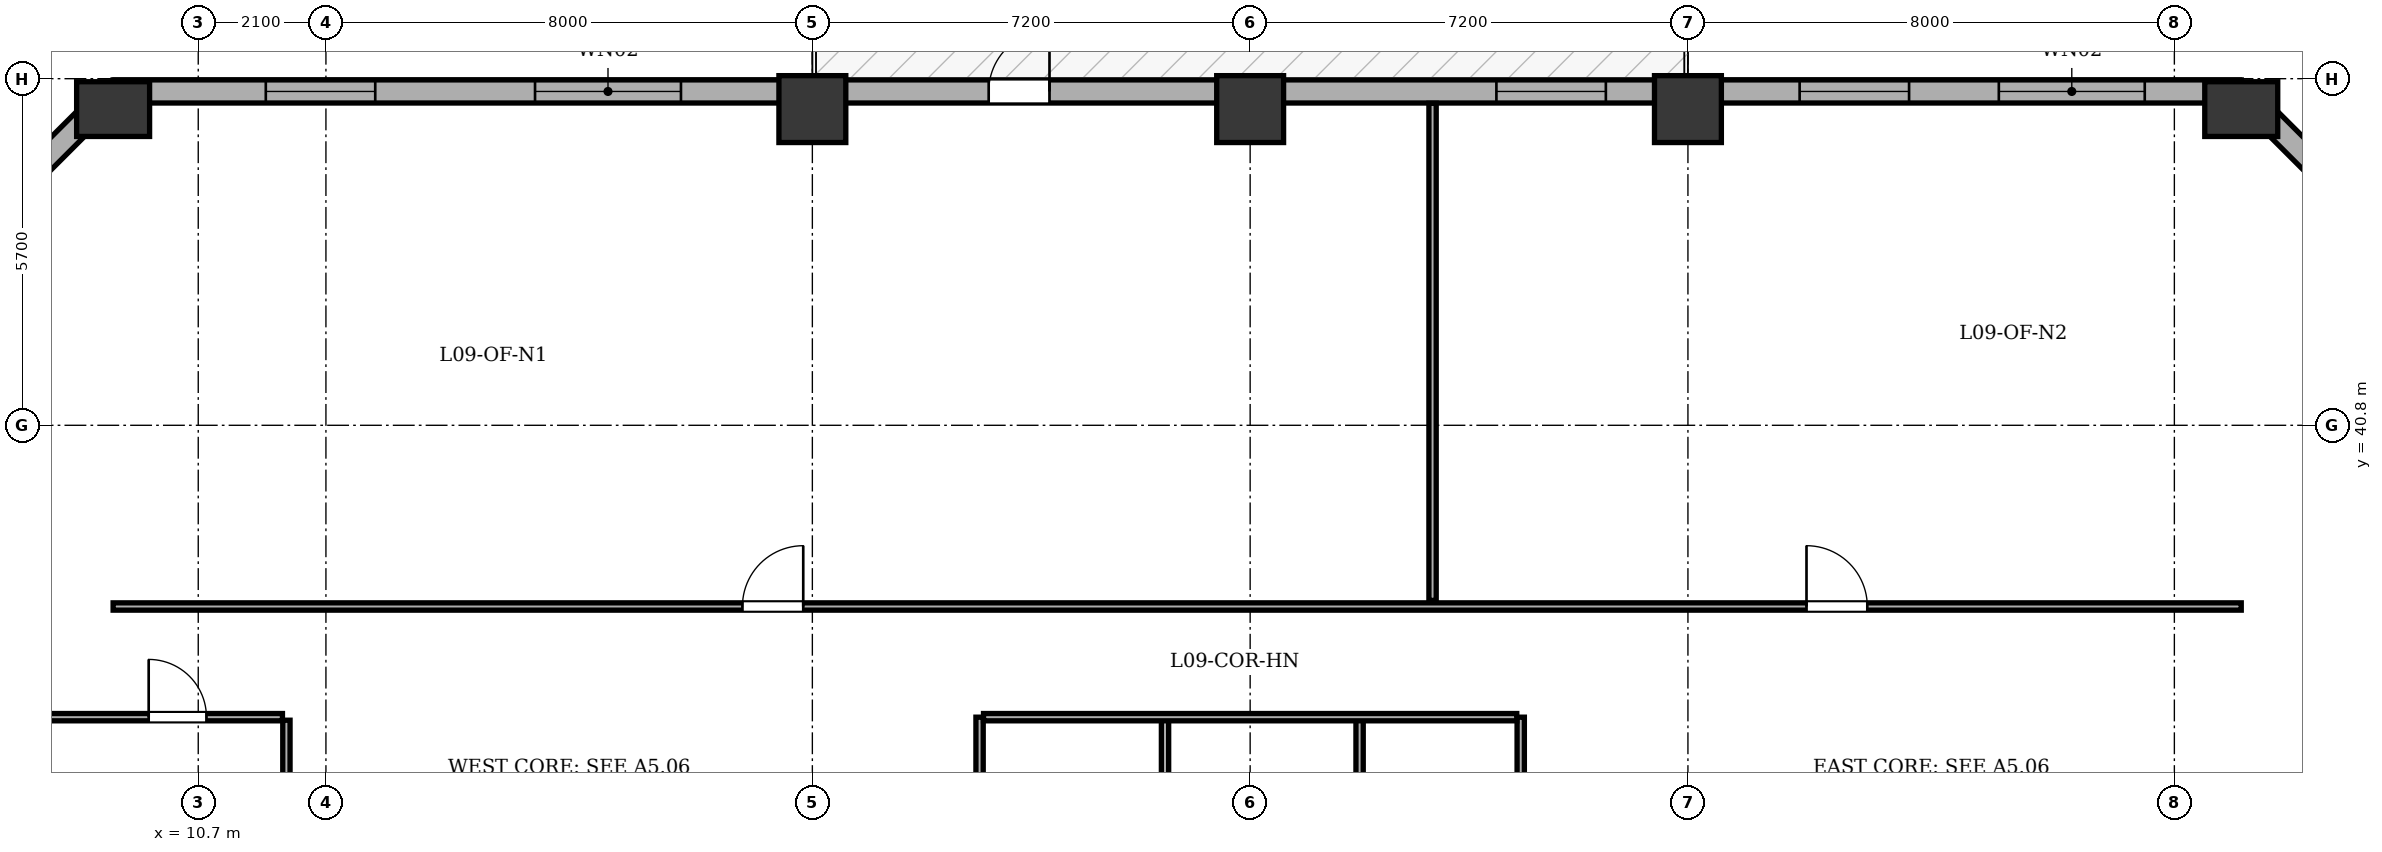
"""IFC4 building model, lengths in metres.
Left out: names, types, materials, properties, quantities, classifications, styles, units other than length and angle.
Written with IfcOpenShell. Run it as: python <this file> out.ifc"""

import sys

from ifc_helpers import new_model, si_unit, direction, frame, frame_2d, origin, origin_2d, place, context, subcontext, project, spatial, rectangle, extrude, element, fill, save


model = new_model("IFC4")
c1 = context("Model", 3, precision=1e-05, world=origin(), true_north=direction((0.0, 1.0)))
c2 = subcontext(c1, "Body", "Model", "MODEL_VIEW")
j1 = project(units=[si_unit("LENGTHUNIT", "METRE"), si_unit("PLANEANGLEUNIT", "RADIAN")], contexts=[c1])
p1 = place(None, origin())
s1 = spatial("IfcSite", under=j1, at=p1, CompositionType="ELEMENT")
p2 = place(p1, origin())
s2 = spatial("IfcBuilding", under=s1, at=p2, CompositionType="ELEMENT")
p3 = place(p2, frame((0.0, 0.0, 39.9)))
s3 = spatial("IfcBuildingStorey", under=s2, at=p3, CompositionType="ELEMENT", Elevation=39.9)
p4 = place(p3, frame((9.3, 46.0, 0.0), z_axis=(0.0, 0.0, 1.0), x_axis=(1.0, 0.0, 0.0)))
e1 = element("IfcColumn", 1, at=p4, inside=s3, PredefinedType="COLUMN", context=c2, shape_type="SweptSolid", body=[
    extrude(rectangle(XDim=0.9, YDim=1.2, at=origin_2d()), origin(), (0.0, 0.0, 1.0), 3.9),
])
for number, where, z_axis, x_axis in (
    (2, (20.8, 46.0, 0.0), (0.0, 0.0, 1.0), (1.0, 0.0, 0.0)),
    (3, (28.0, 46.0, 0.0), (0.0, 0.0, 1.0), (1.0, 0.0, 0.0)),
    (4, (35.2, 46.0, 0.0), (0.0, 0.0, 1.0), (1.0, 0.0, 0.0)),
):
    element("IfcColumn", number, at=place(p3, frame(where, z_axis=z_axis, x_axis=x_axis)), inside=s3, PredefinedType="COLUMN", context=c2, shape_type="SweptSolid", body=[
        extrude(rectangle(XDim=1.1, YDim=1.1, at=origin_2d()), origin(), (0.0, 0.0, 1.0), 3.9),
    ])
p5 = place(p3, frame((44.3, 46.0, 0.0), z_axis=(0.0, 0.0, 1.0), x_axis=(1.0, 0.0, 0.0)))
e5 = element("IfcColumn", 5, at=p5, inside=s3, PredefinedType="COLUMN", context=c2, shape_type="SweptSolid", body=[
    extrude(rectangle(XDim=0.9, YDim=1.2, at=origin_2d()), origin(), (0.0, 0.0, 1.0), 3.9),
])
p6 = place(p3, frame((4.51, 41.5, 0.0), z_axis=(0.0, 0.0, 1.0), x_axis=(0.707106781187, 0.707106781187, 0.0)))
e6 = element("IfcWall", 6, at=p6, inside=s3, PredefinedType="STANDARD", context=c2, shape_type="SweptSolid", body=[
    extrude(rectangle(XDim=6.774, YDim=0.38, at=frame_2d((3.387, 0.0))), origin(), (0.0, 0.0, 1.0), 3.135),
])
p7 = place(p6, frame((2.687, 0.0, 0.8)))
e7 = element("IfcOpeningElement", 7, at=p7, cuts=e6, PredefinedType="OPENING", context=c2, shape_type="SweptSolid", body=[
    extrude(rectangle(XDim=1.4, YDim=1.65, at=frame_2d((0.7, 0.825))), frame((0.0, 0.2, 0.0), z_axis=(0.0, -1.0, 0.0), x_axis=(1.0, 0.0, 0.0)), (0.0, 0.0, 1.0), 0.4),
])
p8 = place(p3, frame((9.3, 46.29, 0.0), z_axis=(0.0, 0.0, 1.0), x_axis=(1.0, 0.0, 0.0)))
e8 = element("IfcWall", 8, at=p8, inside=s3, PredefinedType="STANDARD", context=c2, shape_type="SweptSolid", body=[
    extrude(rectangle(XDim=35.0, YDim=0.38, at=frame_2d((17.5, 0.0))), origin(), (0.0, 0.0, 1.0), 3.135),
])
p9 = place(p8, frame((14.4, 0.0, 0.0)))
e9 = element("IfcOpeningElement", 9, at=p9, cuts=e8, PredefinedType="OPENING", context=c2, shape_type="SweptSolid", body=[
    extrude(rectangle(XDim=1.0, YDim=2.02, at=frame_2d((0.5, 1.01))), frame((0.0, 0.2, 0.0), z_axis=(0.0, -1.0, 0.0), x_axis=(1.0, 0.0, 0.0)), (0.0, 0.0, 1.0), 0.4),
])
p10 = place(p8, frame((2.511, 0.0, 0.8)))
e10 = element("IfcOpeningElement", 10, at=p10, cuts=e8, PredefinedType="OPENING", context=c2, shape_type="SweptSolid", body=[
    extrude(rectangle(XDim=1.8, YDim=1.9, at=frame_2d((0.9, 0.95))), frame((0.0, 0.2, 0.0), z_axis=(0.0, -1.0, 0.0), x_axis=(1.0, 0.0, 0.0)), (0.0, 0.0, 1.0), 0.4),
])
p11 = place(p8, frame((6.939, 0.0, 0.8)))
e11 = element("IfcOpeningElement", 11, at=p11, cuts=e8, PredefinedType="OPENING", context=c2, shape_type="SweptSolid", body=[
    extrude(rectangle(XDim=2.4, YDim=1.9, at=frame_2d((1.2, 0.95))), frame((0.0, 0.2, 0.0), z_axis=(0.0, -1.0, 0.0), x_axis=(1.0, 0.0, 0.0)), (0.0, 0.0, 1.0), 0.4),
])
p12 = place(p8, frame((22.75, 0.0, 0.8)))
e12 = element("IfcOpeningElement", 12, at=p12, cuts=e8, PredefinedType="OPENING", context=c2, shape_type="SweptSolid", body=[
    extrude(rectangle(XDim=1.8, YDim=1.9, at=frame_2d((0.9, 0.95))), frame((0.0, 0.2, 0.0), z_axis=(0.0, -1.0, 0.0), x_axis=(1.0, 0.0, 0.0)), (0.0, 0.0, 1.0), 0.4),
])
p13 = place(p8, frame((27.737, 0.0, 0.8)))
e13 = element("IfcOpeningElement", 13, at=p13, cuts=e8, PredefinedType="OPENING", context=c2, shape_type="SweptSolid", body=[
    extrude(rectangle(XDim=1.8, YDim=1.9, at=frame_2d((0.9, 0.95))), frame((0.0, 0.2, 0.0), z_axis=(0.0, -1.0, 0.0), x_axis=(1.0, 0.0, 0.0)), (0.0, 0.0, 1.0), 0.4),
])
p14 = place(p8, frame((31.013, 0.0, 0.8)))
e14 = element("IfcOpeningElement", 14, at=p14, cuts=e8, PredefinedType="OPENING", context=c2, shape_type="SweptSolid", body=[
    extrude(rectangle(XDim=2.4, YDim=1.9, at=frame_2d((1.2, 0.95))), frame((0.0, 0.2, 0.0), z_axis=(0.0, -1.0, 0.0), x_axis=(1.0, 0.0, 0.0)), (0.0, 0.0, 1.0), 0.4),
])
p15 = place(p3, frame((44.3, 46.29, 0.0), z_axis=(0.0, 0.0, 1.0), x_axis=(0.707106781187, -0.707106781187, 0.0)))
e15 = element("IfcWall", 15, at=p15, inside=s3, PredefinedType="STANDARD", context=c2, shape_type="SweptSolid", body=[
    extrude(rectangle(XDim=6.774, YDim=0.38, at=frame_2d((3.387, 0.0))), origin(), (0.0, 0.0, 1.0), 3.135),
])
p16 = place(p15, frame((2.687, 0.0, 0.8)))
e16 = element("IfcOpeningElement", 16, at=p16, cuts=e15, PredefinedType="OPENING", context=c2, shape_type="SweptSolid", body=[
    extrude(rectangle(XDim=1.4, YDim=1.65, at=frame_2d((0.7, 0.825))), frame((0.0, 0.2, 0.0), z_axis=(0.0, -1.0, 0.0), x_axis=(1.0, 0.0, 0.0)), (0.0, 0.0, 1.0), 0.4),
])
for number, where, z_axis, x_axis in (
    (17, (23.55, 24.715, 0.0), (0.0, 0.0, 1.0), (0.0, 1.0, 0.0)),
    (18, (32.45, 24.715, 0.0), (0.0, 0.0, 1.0), (0.0, 1.0, 0.0)),
    (19, (26.6, 24.715, 0.0), (0.0, 0.0, 1.0), (0.0, 1.0, 0.0)),
):
    element("IfcWall", number, at=place(p3, frame(where, z_axis=z_axis, x_axis=x_axis)), inside=s3, PredefinedType="PARTITIONING", context=c2, shape_type="SweptSolid", body=[
        extrude(rectangle(XDim=11.285, YDim=0.12, at=frame_2d((5.643, 0.0))), origin(), (0.0, 0.0, 1.0), 3.6),
    ])
p17 = place(p3, frame((29.8, 24.715, 0.0), z_axis=(0.0, 0.0, 1.0), x_axis=(0.0, 1.0, 0.0)))
e20 = element("IfcWall", 20, at=p17, inside=s3, PredefinedType="PARTITIONING", context=c2, shape_type="SweptSolid", body=[
    extrude(rectangle(XDim=11.285, YDim=0.12, at=frame_2d((5.643, 0.0))), origin(), (0.0, 0.0, 1.0), 3.135),
])
p18 = place(p3, frame((23.615, 36.0, 0.0), z_axis=(0.0, 0.0, 1.0), x_axis=(1.0, 0.0, 0.0)))
e21 = element("IfcWall", 21, at=p18, inside=s3, PredefinedType="PARTITIONING", context=c2, shape_type="SweptSolid", body=[
    extrude(rectangle(XDim=8.77, YDim=0.12, at=frame_2d((4.385, 0.0))), origin(), (0.0, 0.0, 1.0), 3.6),
])
p19 = place(p3, frame((9.3, 37.82, 0.0), z_axis=(0.0, 0.0, 1.0), x_axis=(1.0, 0.0, 0.0)))
e22 = element("IfcWall", 22, at=p19, inside=s3, PredefinedType="PARTITIONING", context=c2, shape_type="SweptSolid", body=[
    extrude(rectangle(XDim=35.0, YDim=0.12, at=frame_2d((17.5, 0.0))), origin(), (0.0, 0.0, 1.0), 3.6),
])
p20 = place(p19, frame((10.35, 0.0, 0.0)))
e23 = element("IfcOpeningElement", 23, at=p20, cuts=e22, PredefinedType="OPENING", context=c2, shape_type="SweptSolid", body=[
    extrude(rectangle(XDim=1.0, YDim=2.1, at=frame_2d((0.5, 1.05))), frame((0.0, 0.07, 0.0), z_axis=(0.0, -1.0, 0.0), x_axis=(1.0, 0.0, 0.0)), (0.0, 0.0, 1.0), 0.14),
])
p21 = place(p19, frame((27.85, 0.0, 0.0)))
e24 = element("IfcOpeningElement", 24, at=p21, cuts=e22, PredefinedType="OPENING", context=c2, shape_type="SweptSolid", body=[
    extrude(rectangle(XDim=1.0, YDim=2.1, at=frame_2d((0.5, 1.05))), frame((0.0, 0.07, 0.0), z_axis=(0.0, -1.0, 0.0), x_axis=(1.0, 0.0, 0.0)), (0.0, 0.0, 1.0), 0.14),
])
p22 = place(p3, frame((31.0, 37.92, 0.0), z_axis=(0.0, 0.0, 1.0), x_axis=(0.0, 1.0, 0.0)))
e25 = element("IfcWall", 25, at=p22, inside=s3, PredefinedType="PARTITIONING", context=c2, shape_type="SweptSolid", body=[
    extrude(rectangle(XDim=8.175, YDim=0.12, at=frame_2d((4.087, 0.0))), origin(), (0.0, 0.0, 1.0), 3.6),
])
p23 = place(p3, frame((12.15, 18.45, 0.0), z_axis=(0.0, 0.0, 1.0), x_axis=(0.0, 1.0, 0.0)))
e26 = element("IfcWall", 26, at=p23, inside=s3, PredefinedType="PARTITIONING", context=c2, shape_type="SweptSolid", body=[
    extrude(rectangle(XDim=17.5, YDim=0.12, at=frame_2d((8.75, 0.0))), origin(), (0.0, 0.0, 1.0), 3.6),
])
p24 = place(p3, frame((4.705, 36.0, 0.0), z_axis=(0.0, 0.0, 1.0), x_axis=(1.0, 0.0, 0.0)))
e27 = element("IfcWall", 27, at=p24, inside=s3, PredefinedType="PARTITIONING", context=c2, shape_type="SweptSolid", body=[
    extrude(rectangle(XDim=7.38, YDim=0.12, at=frame_2d((3.69, 0.0))), origin(), (0.0, 0.0, 1.0), 3.6),
])
p25 = place(p24, frame((5.18, 0.0, 0.0)))
e28 = element("IfcOpeningElement", 28, at=p25, cuts=e27, PredefinedType="OPENING", context=c2, shape_type="SweptSolid", body=[
    extrude(rectangle(XDim=0.95, YDim=2.1, at=frame_2d((0.475, 1.05))), frame((0.0, 0.07, 0.0), z_axis=(0.0, -1.0, 0.0), x_axis=(1.0, 0.0, 0.0)), (0.0, 0.0, 1.0), 0.14),
])
p26 = place(p9, origin())
e29 = element("IfcDoor", 29, at=p26, inside=s3, OperationType="SINGLE_SWING_RIGHT", PredefinedType="DOOR", context=c2, shape_type="SweptSolid", body=[
    extrude(rectangle(XDim=1.0, YDim=2.02, at=frame_2d((0.5, 1.01))), frame((0.0, 0.025, 0.0), z_axis=(0.0, -1.0, 0.0), x_axis=(1.0, 0.0, 0.0)), (0.0, 0.0, 1.0), 0.05),
])
fill(e9, e29)
p27 = place(p10, origin())
e30 = element("IfcWindow", 30, at=p27, inside=s3, PartitioningType="SINGLE_PANEL", PredefinedType="WINDOW", context=c2, shape_type="SweptSolid", body=[
    extrude(rectangle(XDim=1.8, YDim=1.9, at=frame_2d((0.9, 0.95))), frame((0.0, -0.01, 0.0), z_axis=(0.0, -1.0, 0.0), x_axis=(1.0, 0.0, 0.0)), (0.0, 0.0, 1.0), 0.06),
])
fill(e10, e30)
p28 = place(p11, origin())
e31 = element("IfcWindow", 31, at=p28, inside=s3, PartitioningType="SINGLE_PANEL", PredefinedType="WINDOW", context=c2, shape_type="SweptSolid", body=[
    extrude(rectangle(XDim=2.4, YDim=1.9, at=frame_2d((1.2, 0.95))), frame((0.0, -0.01, 0.0), z_axis=(0.0, -1.0, 0.0), x_axis=(1.0, 0.0, 0.0)), (0.0, 0.0, 1.0), 0.06),
])
fill(e11, e31)
p29 = place(p12, origin())
e32 = element("IfcWindow", 32, at=p29, inside=s3, PartitioningType="SINGLE_PANEL", PredefinedType="WINDOW", context=c2, shape_type="SweptSolid", body=[
    extrude(rectangle(XDim=1.8, YDim=1.9, at=frame_2d((0.9, 0.95))), frame((0.0, -0.01, 0.0), z_axis=(0.0, -1.0, 0.0), x_axis=(1.0, 0.0, 0.0)), (0.0, 0.0, 1.0), 0.06),
])
fill(e12, e32)
p30 = place(p13, origin())
e33 = element("IfcWindow", 33, at=p30, inside=s3, PartitioningType="SINGLE_PANEL", PredefinedType="WINDOW", context=c2, shape_type="SweptSolid", body=[
    extrude(rectangle(XDim=1.8, YDim=1.9, at=frame_2d((0.9, 0.95))), frame((0.0, -0.01, 0.0), z_axis=(0.0, -1.0, 0.0), x_axis=(1.0, 0.0, 0.0)), (0.0, 0.0, 1.0), 0.06),
])
fill(e13, e33)
p31 = place(p14, origin())
e34 = element("IfcWindow", 34, at=p31, inside=s3, PartitioningType="SINGLE_PANEL", PredefinedType="WINDOW", context=c2, shape_type="SweptSolid", body=[
    extrude(rectangle(XDim=2.4, YDim=1.9, at=frame_2d((1.2, 0.95))), frame((0.0, -0.01, 0.0), z_axis=(0.0, -1.0, 0.0), x_axis=(1.0, 0.0, 0.0)), (0.0, 0.0, 1.0), 0.06),
])
fill(e14, e34)
p32 = place(p20, origin())
e35 = element("IfcDoor", 35, at=p32, inside=s3, OperationType="SINGLE_SWING_RIGHT", PredefinedType="DOOR", context=c2, shape_type="SweptSolid", body=[
    extrude(rectangle(XDim=1.0, YDim=2.1, at=frame_2d((0.5, 1.05))), frame((0.0, 0.025, 0.0), z_axis=(0.0, -1.0, 0.0), x_axis=(1.0, 0.0, 0.0)), (0.0, 0.0, 1.0), 0.05),
])
fill(e23, e35)
p33 = place(p21, origin())
e36 = element("IfcDoor", 36, at=p33, inside=s3, OperationType="SINGLE_SWING_LEFT", PredefinedType="DOOR", context=c2, shape_type="SweptSolid", body=[
    extrude(rectangle(XDim=1.0, YDim=2.1, at=frame_2d((0.5, 1.05))), frame((0.0, 0.025, 0.0), z_axis=(0.0, -1.0, 0.0), x_axis=(1.0, 0.0, 0.0)), (0.0, 0.0, 1.0), 0.05),
])
fill(e24, e36)
p34 = place(p25, origin())
e37 = element("IfcDoor", 37, at=p34, inside=s3, OperationType="SINGLE_SWING_LEFT", PredefinedType="DOOR", context=c2, shape_type="SweptSolid", body=[
    extrude(rectangle(XDim=0.95, YDim=2.1, at=frame_2d((0.475, 1.05))), frame((0.0, 0.025, 0.0), z_axis=(0.0, -1.0, 0.0), x_axis=(1.0, 0.0, 0.0)), (0.0, 0.0, 1.0), 0.05),
])
fill(e28, e37)
save(model, sys.argv[1])
